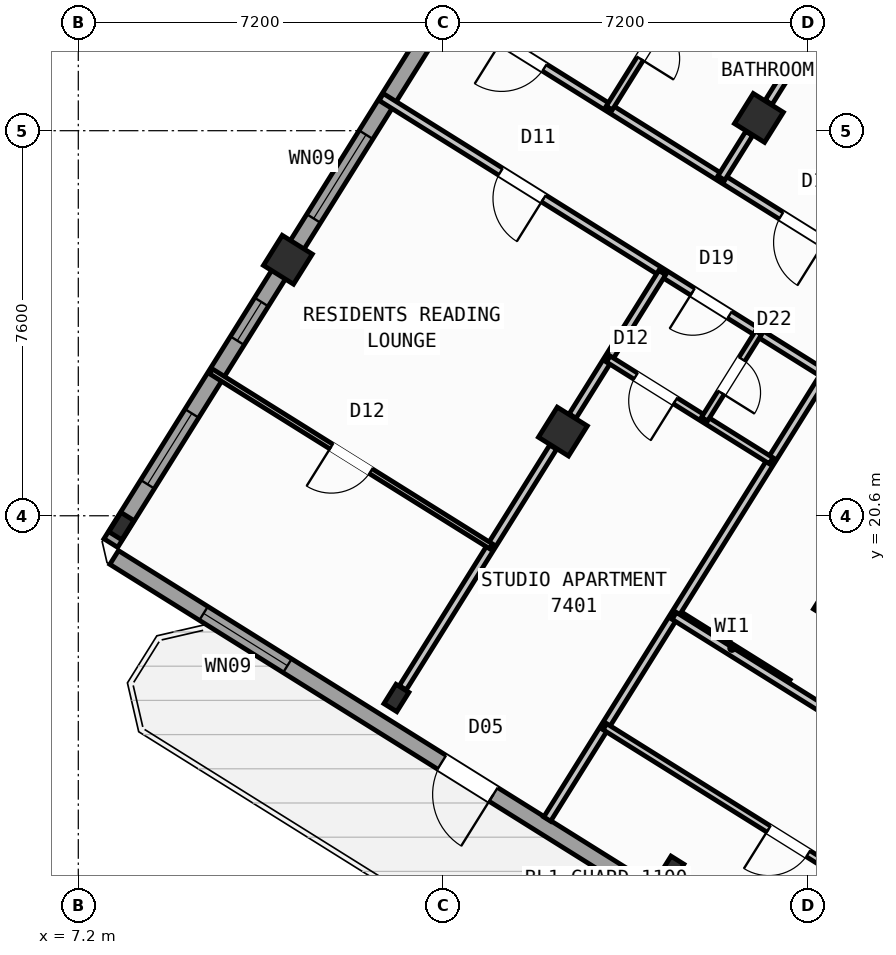
"""IFC4 building model, lengths in metres.
Left out: names, types, materials, properties, quantities, classifications, styles, units other than length and angle.
Written with IfcOpenShell. Run it as: python <this file> out.ifc"""

import sys

from ifc_helpers import new_model, si_unit, direction, frame, frame_2d, origin, origin_2d, place, context, subcontext, project, spatial, rectangle, hollow_rectangle, i_section, extrude, source, transform, mapped, element, fill, save


model = new_model("IFC4")
c1 = context("Model", 3, precision=1e-05, world=origin(), true_north=direction((0.0, 1.0)))
c2 = subcontext(c1, "Body", "Model", "MODEL_VIEW")
j1 = project(units=[si_unit("LENGTHUNIT", "METRE"), si_unit("PLANEANGLEUNIT", "RADIAN")], contexts=[c1])
p1 = place(None, origin())
s1 = spatial("IfcSite", under=j1, at=p1, CompositionType="ELEMENT")
p2 = place(p1, origin())
s2 = spatial("IfcBuilding", under=s1, at=p2, CompositionType="ELEMENT")
p3 = place(p2, frame((0.0, 0.0, 291.6)))
s3 = spatial("IfcBuildingStorey", under=s2, at=p3, CompositionType="ELEMENT", Elevation=291.6)
m1 = source(origin(), c2, "Body", "SweptSolid", [
    extrude(hollow_rectangle(XDim=0.7, YDim=0.7, WallThickness=0.028, at=origin_2d()), origin(), (0.0, 0.0, 1.0), 3.6),
])
p4 = place(p3, frame((22.191, 18.87, 0.0), z_axis=(0.0, 0.0, 1.0), x_axis=(-0.848048096156, 0.529919264233, 0.0)))
e1 = element("IfcColumn", 1, at=p4, inside=s3, PredefinedType="COLUMN", context=c2, shape_type="MappedRepresentation", body=[
    mapped(m1, transform((0.0, 0.0, 0.0), scale=1.0)),
])
m2 = source(origin(), c2, "Body", "SweptSolid", [
    extrude(i_section(OverallWidth=0.3, OverallDepth=0.45, WebThickness=0.014, FlangeThickness=0.026, at=origin_2d()), origin(), (0.0, 0.0, 1.0), 3.6),
])
p5 = place(p3, frame((18.906, 13.612, 0.0), z_axis=(0.0, 0.0, 1.0), x_axis=(-0.848048096156, 0.529919264233, 0.0)))
e2 = element("IfcColumn", 2, at=p5, inside=s3, PredefinedType="COLUMN", context=c2, shape_type="MappedRepresentation", body=[
    mapped(m2, transform((0.0, 0.0, 0.0), scale=1.0)),
])
for number, where, z_axis, x_axis in (
    (3, (20.632, 28.452, 0.0), (0.0, 0.0, 1.0), (-0.848, 0.53, 0.0)),
    (4, (16.764, 22.261, 0.0), (0.0, 0.0, 1.0), (-0.848, 0.53, 0.0)),
):
    element("IfcColumn", number, at=place(p3, frame(where, z_axis=z_axis, x_axis=x_axis)), inside=s3, PredefinedType="COLUMN", context=c2, shape_type="MappedRepresentation", body=[
        mapped(m1, transform((0.0, 0.0, 0.0), scale=1.0)),
    ])
p6 = place(p3, frame((13.478, 17.003, 0.0), z_axis=(0.0, 0.0, 1.0), x_axis=(-0.848048096156, 0.529919264233, 0.0)))
e5 = element("IfcColumn", 5, at=p6, inside=s3, PredefinedType="COLUMN", context=c2, shape_type="MappedRepresentation", body=[
    mapped(m2, transform((0.0, 0.0, 0.0), scale=1.0)),
])
p7 = place(p3, frame((11.336, 25.653, 0.0), z_axis=(0.0, 0.0, 1.0), x_axis=(-0.848048096156, 0.529919264233, 0.0)))
e6 = element("IfcColumn", 6, at=p7, inside=s3, PredefinedType="COLUMN", context=c2, shape_type="MappedRepresentation", body=[
    mapped(m1, transform((0.0, 0.0, 0.0), scale=1.0)),
])
p8 = place(p3, frame((8.051, 20.395, 0.0), z_axis=(0.0, 0.0, 1.0), x_axis=(-0.848048096156, 0.529919264233, 0.0)))
e7 = element("IfcColumn", 7, at=p8, inside=s3, PredefinedType="COLUMN", context=c2, shape_type="MappedRepresentation", body=[
    mapped(m2, transform((0.0, 0.0, 0.0), scale=1.0)),
])
p9 = place(p3, frame((29.268, 6.429, 0.0), z_axis=(0.0, 0.0, 1.0), x_axis=(-0.848048398186, 0.529918780885, 0.0)))
e8 = element("IfcWall", 8, at=p9, inside=s3, PredefinedType="STANDARD", context=c2, shape_type="SweptSolid", body=[
    extrude(rectangle(XDim=25.188, YDim=0.32, at=frame_2d((12.594, 0.0))), origin(), (0.0, 0.0, 1.0), 3.35),
])
p10 = place(p9, frame((16.362, 0.0, 0.0)))
e9 = element("IfcOpeningElement", 9, at=p10, cuts=e8, PredefinedType="OPENING", context=c2, shape_type="SweptSolid", body=[
    extrude(rectangle(XDim=1.2, YDim=2.15, at=frame_2d((0.6, 1.075))), frame((0.0, 0.17, 0.0), z_axis=(0.0, -1.0, 0.0), x_axis=(1.0, 0.0, 0.0)), (0.0, 0.0, 1.0), 0.34),
])
p11 = place(p9, frame((3.859, 0.0, 0.9)))
e10 = element("IfcOpeningElement", 10, at=p11, cuts=e8, PredefinedType="OPENING", context=c2, shape_type="SweptSolid", body=[
    extrude(rectangle(XDim=1.65, YDim=1.45, at=frame_2d((0.825, 0.725))), frame((0.0, 0.17, 0.0), z_axis=(0.0, -1.0, 0.0), x_axis=(1.0, 0.0, 0.0)), (0.0, 0.0, 1.0), 0.34),
])
p12 = place(p9, frame((10.519, 0.0, 0.9)))
e11 = element("IfcOpeningElement", 11, at=p12, cuts=e8, PredefinedType="OPENING", context=c2, shape_type="SweptSolid", body=[
    extrude(rectangle(XDim=1.65, YDim=1.45, at=frame_2d((0.825, 0.725))), frame((0.0, 0.17, 0.0), z_axis=(0.0, -1.0, 0.0), x_axis=(1.0, 0.0, 0.0)), (0.0, 0.0, 1.0), 0.34),
])
p13 = place(p9, frame((21.156, 0.0, 0.95)))
e12 = element("IfcOpeningElement", 12, at=p13, cuts=e8, PredefinedType="OPENING", context=c2, shape_type="SweptSolid", body=[
    extrude(rectangle(XDim=1.95, YDim=1.35, at=frame_2d((0.975, 0.675))), frame((0.0, 0.17, 0.0), z_axis=(0.0, -1.0, 0.0), x_axis=(1.0, 0.0, 0.0)), (0.0, 0.0, 1.0), 0.34),
])
p14 = place(p3, frame((7.842, 20.061, 0.0), z_axis=(0.0, 0.0, 1.0), x_axis=(0.529915577903, 0.84805039962, 0.0)))
e13 = element("IfcWall", 13, at=p14, inside=s3, PredefinedType="STANDARD", context=c2, shape_type="SweptSolid", body=[
    extrude(rectangle(XDim=21.587, YDim=0.32, at=frame_2d((10.794, 0.0))), origin(), (0.0, 0.0, 1.0), 2.875),
])
p15 = place(p14, frame((1.368, 0.0, 0.9)))
e14 = element("IfcOpeningElement", 14, at=p15, cuts=e13, PredefinedType="OPENING", context=c2, shape_type="SweptSolid", body=[
    extrude(rectangle(XDim=1.65, YDim=1.45, at=frame_2d((0.825, 0.725))), frame((0.0, 0.17, 0.0), z_axis=(0.0, -1.0, 0.0), x_axis=(1.0, 0.0, 0.0)), (0.0, 0.0, 1.0), 0.34),
])
p16 = place(p14, frame((4.71, 0.0, 1.0)))
e15 = element("IfcOpeningElement", 15, at=p16, cuts=e13, PredefinedType="OPENING", context=c2, shape_type="SweptSolid", body=[
    extrude(rectangle(XDim=0.9, YDim=1.25, at=frame_2d((0.45, 0.625))), frame((0.0, 0.17, 0.0), z_axis=(0.0, -1.0, 0.0), x_axis=(1.0, 0.0, 0.0)), (0.0, 0.0, 1.0), 0.34),
])
p17 = place(p14, frame((7.554, 0.0, 0.95)))
e16 = element("IfcOpeningElement", 16, at=p17, cuts=e13, PredefinedType="OPENING", context=c2, shape_type="SweptSolid", body=[
    extrude(rectangle(XDim=1.95, YDim=1.35, at=frame_2d((0.975, 0.675))), frame((0.0, 0.17, 0.0), z_axis=(0.0, -1.0, 0.0), x_axis=(1.0, 0.0, 0.0)), (0.0, 0.0, 1.0), 0.34),
])
p18 = place(p14, frame((16.744, 0.0, 1.0)))
e17 = element("IfcOpeningElement", 17, at=p18, cuts=e13, PredefinedType="OPENING", context=c2, shape_type="SweptSolid", body=[
    extrude(rectangle(XDim=0.9, YDim=1.25, at=frame_2d((0.45, 0.625))), frame((0.0, 0.17, 0.0), z_axis=(0.0, -1.0, 0.0), x_axis=(1.0, 0.0, 0.0)), (0.0, 0.0, 1.0), 0.34),
])
p19 = place(p14, frame((18.944, 0.0, 1.0)))
e18 = element("IfcOpeningElement", 18, at=p19, cuts=e13, PredefinedType="OPENING", context=c2, shape_type="SweptSolid", body=[
    extrude(rectangle(XDim=0.9, YDim=1.25, at=frame_2d((0.45, 0.625))), frame((0.0, 0.17, 0.0), z_axis=(0.0, -1.0, 0.0), x_axis=(1.0, 0.0, 0.0)), (0.0, 0.0, 1.0), 0.34),
])
p20 = place(p3, frame((19.566, 38.434, 0.0), z_axis=(0.0, 0.0, 1.0), x_axis=(0.84804567626, -0.529923136858, 0.0)))
e19 = element("IfcWall", 19, at=p20, inside=s3, PredefinedType="STANDARD", context=c2, shape_type="SweptSolid", body=[
    extrude(rectangle(XDim=25.188, YDim=0.32, at=frame_2d((12.594, 0.0))), origin(), (0.0, 0.0, 1.0), 3.35),
])
p21 = place(p20, frame((3.55, 0.0, 0.0)))
e20 = element("IfcOpeningElement", 20, at=p21, cuts=e19, PredefinedType="OPENING", context=c2, shape_type="SweptSolid", body=[
    extrude(rectangle(XDim=1.05, YDim=2.15, at=frame_2d((0.525, 1.075))), frame((0.0, 0.17, 0.0), z_axis=(0.0, -1.0, 0.0), x_axis=(1.0, 0.0, 0.0)), (0.0, 0.0, 1.0), 0.34),
])
p22 = place(p20, frame((7.349, 0.0, 0.9)))
e21 = element("IfcOpeningElement", 21, at=p22, cuts=e19, PredefinedType="OPENING", context=c2, shape_type="SweptSolid", body=[
    extrude(rectangle(XDim=1.65, YDim=1.45, at=frame_2d((0.825, 0.725))), frame((0.0, 0.17, 0.0), z_axis=(0.0, -1.0, 0.0), x_axis=(1.0, 0.0, 0.0)), (0.0, 0.0, 1.0), 0.34),
])
p23 = place(p20, frame((10.754, 0.0, 1.0)))
e22 = element("IfcOpeningElement", 22, at=p23, cuts=e19, PredefinedType="OPENING", context=c2, shape_type="SweptSolid", body=[
    extrude(rectangle(XDim=0.9, YDim=1.25, at=frame_2d((0.45, 0.625))), frame((0.0, 0.17, 0.0), z_axis=(0.0, -1.0, 0.0), x_axis=(1.0, 0.0, 0.0)), (0.0, 0.0, 1.0), 0.34),
])
p24 = place(p20, frame((15.169, 0.0, 0.95)))
e23 = element("IfcOpeningElement", 23, at=p24, cuts=e19, PredefinedType="OPENING", context=c2, shape_type="SweptSolid", body=[
    extrude(rectangle(XDim=1.95, YDim=1.35, at=frame_2d((0.975, 0.675))), frame((0.0, 0.17, 0.0), z_axis=(0.0, -1.0, 0.0), x_axis=(1.0, 0.0, 0.0)), (0.0, 0.0, 1.0), 0.34),
])
p25 = place(p20, frame((20.869, 0.0, 0.95)))
e24 = element("IfcOpeningElement", 24, at=p25, cuts=e19, PredefinedType="OPENING", context=c2, shape_type="SweptSolid", body=[
    extrude(rectangle(XDim=1.95, YDim=1.35, at=frame_2d((0.975, 0.675))), frame((0.0, 0.17, 0.0), z_axis=(0.0, -1.0, 0.0), x_axis=(1.0, 0.0, 0.0)), (0.0, 0.0, 1.0), 0.34),
])
p26 = place(p3, frame((21.206, 17.292, 0.0), z_axis=(0.0, 0.0, 1.0), x_axis=(-0.848050851465, 0.529914854792, 0.0)))
e25 = element("IfcWall", 25, at=p26, inside=s3, PredefinedType="PARTITIONING", context=c2, shape_type="SweptSolid", body=[
    extrude(rectangle(XDim=2.61, YDim=0.16, at=frame_2d((1.305, 0.0))), origin(), (0.0, 0.0, 1.0), 3.34),
])
p27 = place(p3, frame((21.938, 23.391, 0.0), z_axis=(0.0, 0.0, 1.0), x_axis=(-0.529924725692, -0.848044683434, 0.0)))
e26 = element("IfcWall", 26, at=p27, inside=s3, PredefinedType="PARTITIONING", context=c2, shape_type="SweptSolid", body=[
    extrude(rectangle(XDim=10.35, YDim=0.16, at=frame_2d((5.175, 0.0))), origin(), (0.0, 0.0, 1.0), 3.34),
])
p28 = place(p3, frame((23.104, 25.256, 0.0), z_axis=(0.0, 0.0, 1.0), x_axis=(-0.848043444964, 0.529926707624, 0.0)))
e27 = element("IfcWall", 27, at=p28, inside=s3, PredefinedType="PARTITIONING", context=c2, shape_type="SweptSolid", body=[
    extrude(rectangle(XDim=10.33, YDim=0.16, at=frame_2d((5.165, 0.0))), origin(), (0.0, 0.0, 1.0), 3.34),
])
p29 = place(p28, frame((1.395, 0.0, 0.0)))
e28 = element("IfcOpeningElement", 28, at=p29, cuts=e27, PredefinedType="OPENING", context=c2, shape_type="SweptSolid", body=[
    extrude(rectangle(XDim=1.0, YDim=2.1, at=frame_2d((0.5, 1.05))), frame((0.0, 0.09, 0.0), z_axis=(0.0, -1.0, 0.0), x_axis=(1.0, 0.0, 0.0)), (0.0, 0.0, 1.0), 0.18),
])
p30 = place(p28, frame((7.904, 0.0, 0.0)))
e29 = element("IfcOpeningElement", 29, at=p30, cuts=e27, PredefinedType="OPENING", context=c2, shape_type="SweptSolid", body=[
    extrude(rectangle(XDim=1.0, YDim=2.1, at=frame_2d((0.5, 1.05))), frame((0.0, 0.09, 0.0), z_axis=(0.0, -1.0, 0.0), x_axis=(1.0, 0.0, 0.0)), (0.0, 0.0, 1.0), 0.18),
])
p31 = place(p3, frame((21.938, 23.391, 0.0), z_axis=(0.0, 0.0, 1.0), x_axis=(-0.848050081784, 0.529916086552, 0.0)))
e30 = element("IfcWall", 30, at=p31, inside=s3, PredefinedType="PARTITIONING", context=c2, shape_type="SweptSolid", body=[
    extrude(rectangle(XDim=10.33, YDim=0.16, at=frame_2d((5.165, 0.0))), origin(), (0.0, 0.0, 1.0), 3.34),
])
p32 = place(p31, frame((2.22, 0.0, 0.0)))
e31 = element("IfcOpeningElement", 31, at=p32, cuts=e30, PredefinedType="OPENING", context=c2, shape_type="SweptSolid", body=[
    extrude(rectangle(XDim=0.86, YDim=2.05, at=frame_2d((0.43, 1.025))), frame((0.0, 0.09, 0.0), z_axis=(0.0, -1.0, 0.0), x_axis=(1.0, 0.0, 0.0)), (0.0, 0.0, 1.0), 0.18),
])
p33 = place(p31, frame((6.55, 0.0, 0.0)))
e32 = element("IfcOpeningElement", 32, at=p33, cuts=e30, PredefinedType="OPENING", context=c2, shape_type="SweptSolid", body=[
    extrude(rectangle(XDim=1.0, YDim=2.1, at=frame_2d((0.5, 1.05))), frame((0.0, 0.09, 0.0), z_axis=(0.0, -1.0, 0.0), x_axis=(1.0, 0.0, 0.0)), (0.0, 0.0, 1.0), 0.18),
])
p34 = place(p3, frame((18.724, 25.399, 0.0), z_axis=(0.0, 0.0, 1.0), x_axis=(-0.529952920244, -0.848027064618, 0.0)))
e33 = element("IfcWall", 33, at=p34, inside=s3, PredefinedType="PARTITIONING", context=c2, shape_type="SweptSolid", body=[
    extrude(rectangle(XDim=3.338, YDim=0.16, at=frame_2d((1.669, 0.0))), origin(), (0.0, 0.0, 1.0), 2.875),
])
p35 = place(p3, frame((16.572, 21.954, 0.0), z_axis=(0.0, 0.0, 1.0), x_axis=(-0.529904903214, -0.848057069748, 0.0)))
e34 = element("IfcWall", 34, at=p35, inside=s3, PredefinedType="PARTITIONING", context=c2, shape_type="SweptSolid", body=[
    extrude(rectangle(XDim=5.601, YDim=0.16, at=frame_2d((2.801, 0.0))), origin(), (0.0, 0.0, 1.0), 2.875),
])
p36 = place(p3, frame((20.873, 21.686, 0.0), z_axis=(0.0, 0.0, 1.0), x_axis=(-0.84803087207, 0.529946827537, 0.0)))
e35 = element("IfcWall", 35, at=p36, inside=s3, PredefinedType="PLUMBINGWALL", context=c2, shape_type="SweptSolid", body=[
    extrude(rectangle(XDim=3.79, YDim=0.14, at=frame_2d((1.895, 0.0))), origin(), (0.0, 0.0, 1.0), 3.34),
])
p37 = place(p36, frame((2.23, 0.0, 0.0)))
e36 = element("IfcOpeningElement", 36, at=p37, cuts=e35, PredefinedType="OPENING", context=c2, shape_type="SweptSolid", body=[
    extrude(rectangle(XDim=0.92, YDim=2.08, at=frame_2d((0.46, 1.04))), frame((0.0, 0.08, 0.0), z_axis=(0.0, -1.0, 0.0), x_axis=(1.0, 0.0, 0.0)), (0.0, 0.0, 1.0), 0.16),
])
p38 = place(p3, frame((20.624, 24.212, 0.0), z_axis=(0.0, 0.0, 1.0), x_axis=(-0.529933431478, -0.848039243315, 0.0)))
e37 = element("IfcWall", 37, at=p38, inside=s3, PredefinedType="PLUMBINGWALL", context=c2, shape_type="SweptSolid", body=[
    extrude(rectangle(XDim=2.01, YDim=0.14, at=frame_2d((1.005, 0.0))), origin(), (0.0, 0.0, 1.0), 3.025),
])
p39 = place(p38, frame((0.615, 0.0, 0.0)))
e38 = element("IfcOpeningElement", 38, at=p39, cuts=e37, PredefinedType="OPENING", context=c2, shape_type="SweptSolid", body=[
    extrude(rectangle(XDim=0.78, YDim=2.05, at=frame_2d((0.39, 1.025))), frame((0.0, 0.08, 0.0), z_axis=(0.0, -1.0, 0.0), x_axis=(1.0, 0.0, 0.0)), (0.0, 0.0, 1.0), 0.16),
])
p40 = place(p3, frame((15.348, 19.995, 0.0), z_axis=(0.0, 0.0, 1.0), x_axis=(-0.848048787466, 0.529918157905, 0.0)))
e39 = element("IfcWall", 39, at=p40, inside=s3, PredefinedType="PARTITIONING", context=c2, shape_type="SweptSolid", body=[
    extrude(rectangle(XDim=6.52, YDim=0.11, at=frame_2d((3.26, 0.0))), origin(), (0.0, 0.0, 1.0), 3.34),
])
p41 = place(p40, frame((2.8, 0.0, 0.0)))
e40 = element("IfcOpeningElement", 40, at=p41, cuts=e39, PredefinedType="OPENING", context=c2, shape_type="SweptSolid", body=[
    extrude(rectangle(XDim=0.92, YDim=2.08, at=frame_2d((0.46, 1.04))), frame((0.0, 0.065, 0.0), z_axis=(0.0, -1.0, 0.0), x_axis=(1.0, 0.0, 0.0)), (0.0, 0.0, 1.0), 0.13),
])
p42 = place(p3, frame((24.309, 34.336, 0.0), z_axis=(0.0, 0.0, 1.0), x_axis=(-0.529895484599, -0.848062954858, 0.0)))
e41 = element("IfcWall", 41, at=p42, inside=s3, PredefinedType="PARTITIONING", context=c2, shape_type="SweptSolid", body=[
    extrude(rectangle(XDim=6.576, YDim=0.16, at=frame_2d((3.288, 0.0))), origin(), (0.0, 0.0, 1.0), 2.875),
])
p43 = place(p3, frame((20.44, 28.145, 0.0), z_axis=(0.0, 0.0, 1.0), x_axis=(-0.529977795385, -0.848011519025, 0.0)))
e42 = element("IfcWall", 42, at=p43, inside=s3, PredefinedType="PARTITIONING", context=c2, shape_type="SweptSolid", body=[
    extrude(rectangle(XDim=1.038, YDim=0.16, at=frame_2d((0.519, 0.0))), origin(), (0.0, 0.0, 1.0), 2.875),
])
p44 = place(p3, frame((19.311, 31.259, 0.0), z_axis=(0.0, 0.0, 1.0), x_axis=(-0.52989206052, -0.848065094316, 0.0)))
e43 = element("IfcWall", 43, at=p44, inside=s3, PredefinedType="PLUMBINGWALL", context=c2, shape_type="SweptSolid", body=[
    extrude(rectangle(XDim=3.08, YDim=0.14, at=frame_2d((1.54, 0.0))), origin(), (0.0, 0.0, 1.0), 3.34),
])
p45 = place(p44, frame((1.15, 0.0, 0.0)))
e44 = element("IfcOpeningElement", 44, at=p45, cuts=e43, PredefinedType="OPENING", context=c2, shape_type="SweptSolid", body=[
    extrude(rectangle(XDim=0.78, YDim=2.05, at=frame_2d((0.39, 1.025))), frame((0.0, 0.08, 0.0), z_axis=(0.0, -1.0, 0.0), x_axis=(1.0, 0.0, 0.0)), (0.0, 0.0, 1.0), 0.16),
])
p46 = place(p3, frame((32.164, 10.374, 0.0), z_axis=(0.0, 0.0, 1.0), x_axis=(-0.848044107957, 0.529925646633, 0.0)))
e45 = element("IfcWall", 45, at=p46, inside=s3, PredefinedType="PARTITIONING", context=c2, shape_type="SweptSolid", body=[
    extrude(rectangle(XDim=15.57, YDim=0.16, at=frame_2d((7.785, 0.0))), origin(), (0.0, 0.0, 1.0), 3.34),
])
p47 = place(p46, frame((10.83, 0.0, 0.0)))
e46 = element("IfcOpeningElement", 46, at=p47, cuts=e45, PredefinedType="OPENING", context=c2, shape_type="SweptSolid", body=[
    extrude(rectangle(XDim=1.0, YDim=2.1, at=frame_2d((0.5, 1.05))), frame((0.0, 0.09, 0.0), z_axis=(0.0, -1.0, 0.0), x_axis=(1.0, 0.0, 0.0)), (0.0, 0.0, 1.0), 0.18),
])
p48 = place(p3, frame((29.72, 8.859, 0.0), z_axis=(0.0, 0.0, 1.0), x_axis=(-0.848049134363, 0.529917602752, 0.0)))
e47 = element("IfcWall", 47, at=p48, inside=s3, PredefinedType="PLUMBINGWALL", context=c2, shape_type="SweptSolid", body=[
    extrude(rectangle(XDim=14.3, YDim=0.14, at=frame_2d((7.15, 0.0))), origin(), (0.0, 0.0, 1.0), 3.34),
])
p49 = place(p48, frame((9.57, 0.0, 0.0)))
e48 = element("IfcOpeningElement", 48, at=p49, cuts=e47, PredefinedType="OPENING", context=c2, shape_type="SweptSolid", body=[
    extrude(rectangle(XDim=0.92, YDim=2.08, at=frame_2d((0.46, 1.04))), frame((0.0, 0.08, 0.0), z_axis=(0.0, -1.0, 0.0), x_axis=(1.0, 0.0, 0.0)), (0.0, 0.0, 1.0), 0.16),
])
m3 = source(origin(), c2, "Body", "SweptSolid", [
    extrude(rectangle(XDim=1.2, YDim=2.15, at=frame_2d((0.6, 1.075))), frame((0.0, 0.025, 0.0), z_axis=(0.0, -1.0, 0.0), x_axis=(1.0, 0.0, 0.0)), (0.0, 0.0, 1.0), 0.05),
])
p50 = place(p10, origin())
e49 = element("IfcDoor", 49, at=p50, inside=s3, OperationType="SINGLE_SWING_LEFT", PredefinedType="DOOR", context=c2, shape_type="MappedRepresentation", body=[
    mapped(m3, transform((0.0, 0.0, 0.0), scale=1.0)),
])
fill(e9, e49)
m4 = source(origin(), c2, "Body", "SweptSolid", [
    extrude(rectangle(XDim=1.95, YDim=1.35, at=frame_2d((0.975, 0.675))), frame((0.0, 0.03, 0.0), z_axis=(0.0, -1.0, 0.0), x_axis=(1.0, 0.0, 0.0)), (0.0, 0.0, 1.0), 0.06),
])
p51 = place(p13, origin())
e50 = element("IfcWindow", 50, at=p51, inside=s3, PartitioningType="SINGLE_PANEL", PredefinedType="WINDOW", context=c2, shape_type="MappedRepresentation", body=[
    mapped(m4, transform((0.0, 0.0, 0.0), scale=1.0)),
])
fill(e12, e50)
m5 = source(origin(), c2, "Body", "SweptSolid", [
    extrude(rectangle(XDim=1.65, YDim=1.45, at=frame_2d((0.825, 0.725))), frame((0.0, 0.03, 0.0), z_axis=(0.0, -1.0, 0.0), x_axis=(1.0, 0.0, 0.0)), (0.0, 0.0, 1.0), 0.06),
])
p52 = place(p15, origin())
e51 = element("IfcWindow", 51, at=p52, inside=s3, PartitioningType="SINGLE_PANEL", PredefinedType="WINDOW", context=c2, shape_type="MappedRepresentation", body=[
    mapped(m5, transform((0.0, 0.0, 0.0), scale=1.0)),
])
fill(e14, e51)
m6 = source(origin(), c2, "Body", "SweptSolid", [
    extrude(rectangle(XDim=0.9, YDim=1.25, at=frame_2d((0.45, 0.625))), frame((0.0, 0.03, 0.0), z_axis=(0.0, -1.0, 0.0), x_axis=(1.0, 0.0, 0.0)), (0.0, 0.0, 1.0), 0.06),
])
p53 = place(p16, origin())
e52 = element("IfcWindow", 52, at=p53, inside=s3, PartitioningType="SINGLE_PANEL", PredefinedType="WINDOW", context=c2, shape_type="MappedRepresentation", body=[
    mapped(m6, transform((0.0, 0.0, 0.0), scale=1.0)),
])
fill(e15, e52)
p54 = place(p17, origin())
e53 = element("IfcWindow", 53, at=p54, inside=s3, PartitioningType="SINGLE_PANEL", PredefinedType="WINDOW", context=c2, shape_type="MappedRepresentation", body=[
    mapped(m4, transform((0.0, 0.0, 0.0), scale=1.0)),
])
fill(e16, e53)
m7 = source(origin(), c2, "Body", "SweptSolid", [
    extrude(rectangle(XDim=0.86, YDim=2.05, at=frame_2d((0.43, 1.025))), frame((0.0, 0.025, 0.0), z_axis=(0.0, -1.0, 0.0), x_axis=(1.0, 0.0, 0.0)), (0.0, 0.0, 1.0), 0.05),
])
p55 = place(p32, origin())
e54 = element("IfcDoor", 54, at=p55, inside=s3, OperationType="SINGLE_SWING_RIGHT", PredefinedType="DOOR", context=c2, shape_type="MappedRepresentation", body=[
    mapped(m7, transform((0.0, 0.0, 0.0), scale=1.0)),
])
fill(e31, e54)
m8 = source(origin(), c2, "Body", "SweptSolid", [
    extrude(rectangle(XDim=0.92, YDim=2.08, at=frame_2d((0.46, 1.04))), frame((0.0, 0.025, 0.0), z_axis=(0.0, -1.0, 0.0), x_axis=(1.0, 0.0, 0.0)), (0.0, 0.0, 1.0), 0.05),
])
p56 = place(p37, origin())
e55 = element("IfcDoor", 55, at=p56, inside=s3, OperationType="SINGLE_SWING_LEFT", PredefinedType="DOOR", context=c2, shape_type="MappedRepresentation", body=[
    mapped(m8, transform((0.0, 0.0, 0.0), scale=1.0)),
])
fill(e36, e55)
m9 = source(origin(), c2, "Body", "SweptSolid", [
    extrude(rectangle(XDim=0.78, YDim=2.05, at=frame_2d((0.39, 1.025))), frame((0.0, 0.025, 0.0), z_axis=(0.0, -1.0, 0.0), x_axis=(1.0, 0.0, 0.0)), (0.0, 0.0, 1.0), 0.05),
])
p57 = place(p39, origin())
e56 = element("IfcDoor", 56, at=p57, inside=s3, OperationType="SINGLE_SWING_RIGHT", PredefinedType="DOOR", context=c2, shape_type="MappedRepresentation", body=[
    mapped(m9, transform((0.0, 0.0, 0.0), scale=1.0)),
])
fill(e38, e56)
m10 = source(origin(), c2, "Body", "SweptSolid", [
    extrude(rectangle(XDim=1.0, YDim=2.1, at=frame_2d((0.5, 1.05))), frame((0.0, 0.025, 0.0), z_axis=(0.0, -1.0, 0.0), x_axis=(1.0, 0.0, 0.0)), (0.0, 0.0, 1.0), 0.05),
])
p58 = place(p33, origin())
e57 = element("IfcDoor", 57, at=p58, inside=s3, OperationType="SINGLE_SWING_LEFT", PredefinedType="DOOR", context=c2, shape_type="MappedRepresentation", body=[
    mapped(m10, transform((0.0, 0.0, 0.0), scale=1.0)),
])
fill(e32, e57)
p59 = place(p41, origin())
e58 = element("IfcDoor", 58, at=p59, inside=s3, OperationType="SINGLE_SWING_RIGHT", PredefinedType="DOOR", context=c2, shape_type="MappedRepresentation", body=[
    mapped(m8, transform((0.0, 0.0, 0.0), scale=1.0)),
])
fill(e40, e58)
p60 = place(p29, origin())
e59 = element("IfcDoor", 59, at=p60, inside=s3, OperationType="SINGLE_SWING_LEFT", PredefinedType="DOOR", context=c2, shape_type="MappedRepresentation", body=[
    mapped(m10, transform((0.0, 0.0, 0.0), scale=1.0)),
])
fill(e28, e59)
p61 = place(p30, origin())
e60 = element("IfcDoor", 60, at=p61, inside=s3, OperationType="SINGLE_SWING_RIGHT", PredefinedType="DOOR", context=c2, shape_type="MappedRepresentation", body=[
    mapped(m10, transform((0.0, 0.0, 0.0), scale=1.0)),
])
fill(e29, e60)
p62 = place(p45, origin())
e61 = element("IfcDoor", 61, at=p62, inside=s3, OperationType="SINGLE_SWING_RIGHT", PredefinedType="DOOR", context=c2, shape_type="MappedRepresentation", body=[
    mapped(m9, transform((0.0, 0.0, 0.0), scale=1.0)),
])
fill(e44, e61)
p63 = place(p49, origin())
e62 = element("IfcDoor", 62, at=p63, inside=s3, OperationType="SINGLE_SWING_RIGHT", PredefinedType="DOOR", context=c2, shape_type="MappedRepresentation", body=[
    mapped(m8, transform((0.0, 0.0, 0.0), scale=1.0)),
])
fill(e48, e62)
save(model, sys.argv[1])
